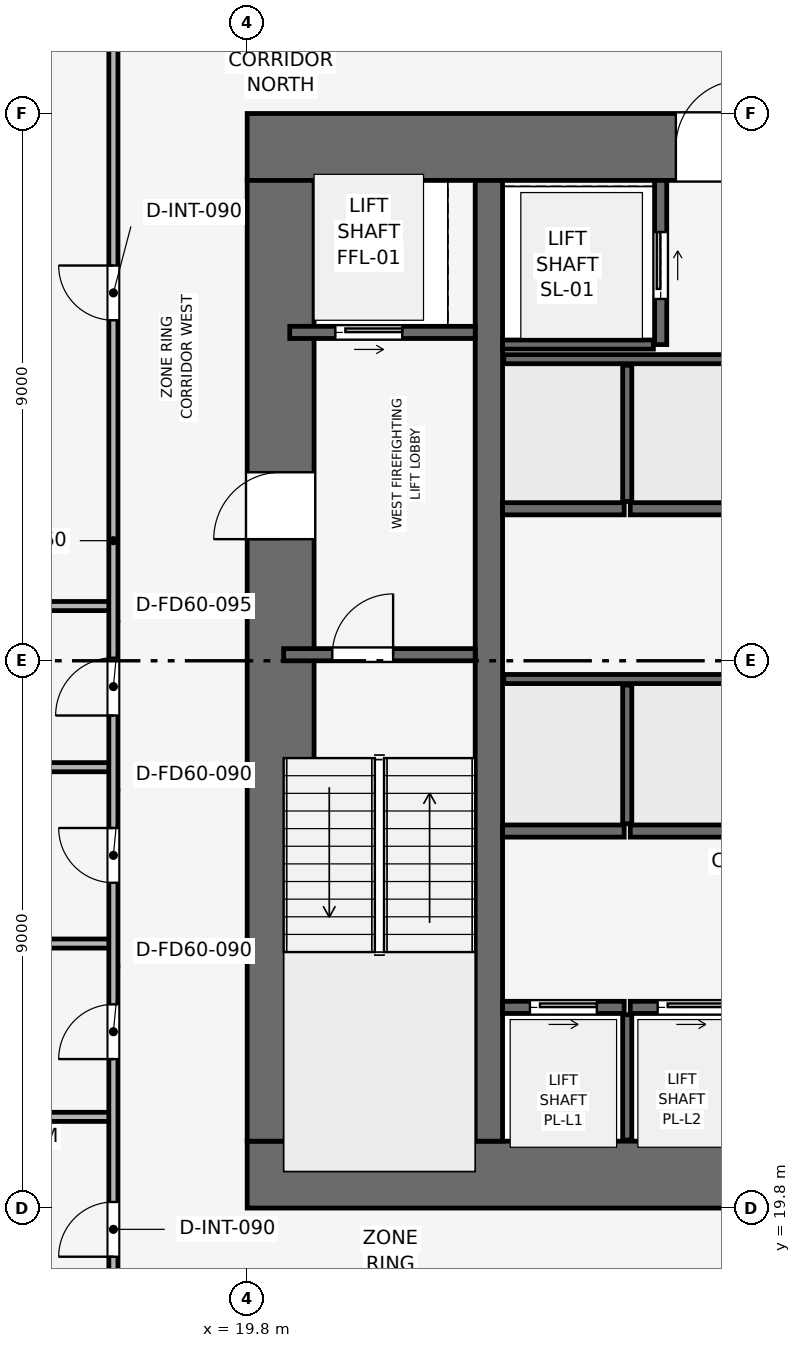
"""IFC4 building model, lengths in metres.
Left out: names, types, materials, properties, quantities, classifications, styles, units other than length and angle.
Written with IfcOpenShell. Run it as: python <this file> out.ifc"""

import sys

from ifc_helpers import new_model, si_unit, direction, frame, frame_2d, origin, place, context, subcontext, project, spatial, rectangle, extrude, element, fill, save


model = new_model("IFC4")
c1 = context("Model", 3, precision=1e-05, world=origin(), true_north=direction((0.0, 1.0)))
c2 = subcontext(c1, "Body", "Model", "MODEL_VIEW")
j1 = project(units=[si_unit("LENGTHUNIT", "METRE"), si_unit("PLANEANGLEUNIT", "RADIAN")], contexts=[c1])
p1 = place(None, origin())
s1 = spatial("IfcSite", under=j1, at=p1, CompositionType="ELEMENT")
p2 = place(p1, origin())
s2 = spatial("IfcBuilding", under=s1, at=p2, CompositionType="ELEMENT")
p3 = place(p2, frame((0.0, 0.0, 76.8)))
s3 = spatial("IfcBuildingStorey", under=s2, at=p3, CompositionType="ELEMENT", Elevation=76.8)
p4 = place(p3, frame((19.8, 20.35, 0.0), z_axis=(0.0, 0.0, 1.0), x_axis=(1.0, 0.0, 0.0)))
e1 = element("IfcWall", 1, at=p4, inside=s3, PredefinedType="SHEAR", context=c2, shape_type="SweptSolid", body=[
    extrude(rectangle(XDim=18.0, YDim=1.1, at=frame_2d((9.0, 0.0))), origin(), (0.0, 0.0, 1.0), 3.9),
])
p5 = place(p4, frame((8.4, 0.0, 0.0)))
e2 = element("IfcOpeningElement", 2, at=p5, cuts=e1, PredefinedType="OPENING", context=c2, shape_type="SweptSolid", body=[
    extrude(rectangle(XDim=1.2, YDim=2.2, at=frame_2d((0.6, 1.1))), frame((0.0, 0.56, 0.0), z_axis=(0.0, -1.0, 0.0), x_axis=(1.0, 0.0, 0.0)), (0.0, 0.0, 1.0), 1.12),
])
p6 = place(p3, frame((19.8, 37.25, 0.0), z_axis=(0.0, 0.0, 1.0), x_axis=(1.0, 0.0, 0.0)))
e3 = element("IfcWall", 3, at=p6, inside=s3, PredefinedType="SHEAR", context=c2, shape_type="SweptSolid", body=[
    extrude(rectangle(XDim=18.0, YDim=1.1, at=frame_2d((9.0, 0.0))), origin(), (0.0, 0.0, 1.0), 3.9),
])
p7 = place(p6, frame((7.05, 0.0, 0.0)))
e4 = element("IfcOpeningElement", 4, at=p7, cuts=e3, PredefinedType="OPENING", context=c2, shape_type="SweptSolid", body=[
    extrude(rectangle(XDim=1.1, YDim=2.15, at=frame_2d((0.55, 1.075))), frame((0.0, 0.56, 0.0), z_axis=(0.0, -1.0, 0.0), x_axis=(1.0, 0.0, 0.0)), (0.0, 0.0, 1.0), 1.12),
])
p8 = place(p3, frame((20.35, 20.9, 0.0), z_axis=(0.0, 0.0, 1.0), x_axis=(0.0, 1.0, 0.0)))
e5 = element("IfcWall", 5, at=p8, inside=s3, PredefinedType="SHEAR", context=c2, shape_type="SweptSolid", body=[
    extrude(rectangle(XDim=15.8, YDim=1.1, at=frame_2d((7.9, 0.0))), origin(), (0.0, 0.0, 1.0), 3.9),
])
p9 = place(p8, frame((9.9, 0.0, 0.0)))
e6 = element("IfcOpeningElement", 6, at=p9, cuts=e5, PredefinedType="OPENING", context=c2, shape_type="SweptSolid", body=[
    extrude(rectangle(XDim=1.1, YDim=2.15, at=frame_2d((0.55, 1.075))), frame((0.0, 0.56, 0.0), z_axis=(0.0, -1.0, 0.0), x_axis=(1.0, 0.0, 0.0)), (0.0, 0.0, 1.0), 1.12),
])
p10 = place(p3, frame((23.775, 20.9, 0.0), z_axis=(0.0, 0.0, 1.0), x_axis=(0.0, 1.0, 0.0)))
e7 = element("IfcWall", 7, at=p10, inside=s3, PredefinedType="SHEAR", context=c2, shape_type="SweptSolid", body=[
    extrude(rectangle(XDim=15.8, YDim=0.45, at=frame_2d((7.9, 0.0))), origin(), (0.0, 0.0, 1.0), 3.9),
])
p11 = place(p3, frame((20.4, 28.9, 0.0), z_axis=(0.0, 0.0, 1.0), x_axis=(1.0, 0.0, 0.0)))
e8 = element("IfcWall", 8, at=p11, inside=s3, PredefinedType="SHEAR", context=c2, shape_type="SweptSolid", body=[
    extrude(rectangle(XDim=3.15, YDim=0.2, at=frame_2d((1.575, 0.0))), origin(), (0.0, 0.0, 1.0), 3.65),
])
p12 = place(p11, frame((0.8, 0.0, 0.0)))
e9 = element("IfcOpeningElement", 9, at=p12, cuts=e8, PredefinedType="OPENING", context=c2, shape_type="SweptSolid", body=[
    extrude(rectangle(XDim=1.0, YDim=2.1, at=frame_2d((0.5, 1.05))), frame((0.0, 0.11, 0.0), z_axis=(0.0, -1.0, 0.0), x_axis=(1.0, 0.0, 0.0)), (0.0, 0.0, 1.0), 0.22),
])
p13 = place(p3, frame((20.5, 34.2, 0.0), z_axis=(0.0, 0.0, 1.0), x_axis=(1.0, 0.0, 0.0)))
e10 = element("IfcWall", 10, at=p13, inside=s3, PredefinedType="SHEAR", context=c2, shape_type="SweptSolid", body=[
    extrude(rectangle(XDim=3.05, YDim=0.2, at=frame_2d((1.525, 0.0))), origin(), (0.0, 0.0, 1.0), 3.65),
])
p14 = place(p13, frame((0.75, 0.0, 0.0)))
e11 = element("IfcOpeningElement", 11, at=p14, cuts=e10, PredefinedType="OPENING", context=c2, shape_type="SweptSolid", body=[
    extrude(rectangle(XDim=1.1, YDim=2.15, at=frame_2d((0.55, 1.075))), frame((0.0, 0.11, 0.0), z_axis=(0.0, -1.0, 0.0), x_axis=(1.0, 0.0, 0.0)), (0.0, 0.0, 1.0), 0.22),
])
p15 = place(p3, frame((26.6, 34.0, 0.0), z_axis=(0.0, 0.0, 1.0), x_axis=(0.0, 1.0, 0.0)))
e12 = element("IfcWall", 12, at=p15, inside=s3, PredefinedType="SHEAR", context=c2, shape_type="SweptSolid", body=[
    extrude(rectangle(XDim=2.7, YDim=0.2, at=frame_2d((1.35, 0.0))), origin(), (0.0, 0.0, 1.0), 3.65),
])
p16 = place(p15, frame((0.75, 0.0, 0.0)))
e13 = element("IfcOpeningElement", 13, at=p16, cuts=e12, PredefinedType="OPENING", context=c2, shape_type="SweptSolid", body=[
    extrude(rectangle(XDim=1.1, YDim=2.15, at=frame_2d((0.55, 1.075))), frame((0.0, 0.11, 0.0), z_axis=(0.0, -1.0, 0.0), x_axis=(1.0, 0.0, 0.0)), (0.0, 0.0, 1.0), 0.22),
])
p17 = place(p3, frame((24.0, 34.0, 0.0), z_axis=(0.0, 0.0, 1.0), x_axis=(1.0, 0.0, 0.0)))
e14 = element("IfcWall", 14, at=p17, inside=s3, PredefinedType="SHEAR", context=c2, shape_type="SweptSolid", body=[
    extrude(rectangle(XDim=2.48, YDim=0.15, at=frame_2d((1.24, 0.0))), origin(), (0.0, 0.0, 1.0), 3.65),
])
p18 = place(p3, frame((24.0, 23.1, 0.0), z_axis=(0.0, 0.0, 1.0), x_axis=(1.0, 0.0, 0.0)))
e15 = element("IfcWall", 15, at=p18, inside=s3, PredefinedType="SHEAR", context=c2, shape_type="SweptSolid", body=[
    extrude(rectangle(XDim=2.0, YDim=0.2, at=frame_2d((1.0, 0.0))), origin(), (0.0, 0.0, 1.0), 3.65),
])
p19 = place(p18, frame((0.45, 0.0, 0.0)))
e16 = element("IfcOpeningElement", 16, at=p19, cuts=e15, PredefinedType="OPENING", context=c2, shape_type="SweptSolid", body=[
    extrude(rectangle(XDim=1.1, YDim=2.15, at=frame_2d((0.55, 1.075))), frame((0.0, 0.11, 0.0), z_axis=(0.0, -1.0, 0.0), x_axis=(1.0, 0.0, 0.0)), (0.0, 0.0, 1.0), 0.22),
])
p20 = place(p3, frame((26.1, 23.1, 0.0), z_axis=(0.0, 0.0, 1.0), x_axis=(1.0, 0.0, 0.0)))
e17 = element("IfcWall", 17, at=p20, inside=s3, PredefinedType="SHEAR", context=c2, shape_type="SweptSolid", body=[
    extrude(rectangle(XDim=2.0, YDim=0.2, at=frame_2d((1.0, 0.0))), origin(), (0.0, 0.0, 1.0), 3.65),
])
p21 = place(p20, frame((0.45, 0.0, 0.0)))
e18 = element("IfcOpeningElement", 18, at=p21, cuts=e17, PredefinedType="OPENING", context=c2, shape_type="SweptSolid", body=[
    extrude(rectangle(XDim=1.1, YDim=2.15, at=frame_2d((0.55, 1.075))), frame((0.0, 0.11, 0.0), z_axis=(0.0, -1.0, 0.0), x_axis=(1.0, 0.0, 0.0)), (0.0, 0.0, 1.0), 0.22),
])
for number, where, z_axis, x_axis in (
    (19, (24.0, 26.0, 0.0), (0.0, 0.0, 1.0), (1.0, 0.0, 0.0)),
    (20, (26.1, 26.0, 0.0), (0.0, 0.0, 1.0), (1.0, 0.0, 0.0)),
    (21, (24.0, 31.3, 0.0), (0.0, 0.0, 1.0), (1.0, 0.0, 0.0)),
    (22, (26.1, 31.3, 0.0), (0.0, 0.0, 1.0), (1.0, 0.0, 0.0)),
):
    element("IfcWall", number, at=place(p3, frame(where, z_axis=z_axis, x_axis=x_axis)), inside=s3, PredefinedType="SHEAR", context=c2, shape_type="SweptSolid", body=[
        extrude(rectangle(XDim=2.0, YDim=0.2, at=frame_2d((1.0, 0.0))), origin(), (0.0, 0.0, 1.0), 3.65),
    ])
p22 = place(p3, frame((26.05, 20.92, 0.0), z_axis=(0.0, 0.0, 1.0), x_axis=(0.0, 1.0, 0.0)))
e23 = element("IfcWall", 23, at=p22, inside=s3, PredefinedType="SHEAR", context=c2, shape_type="SweptSolid", body=[
    extrude(rectangle(XDim=2.06, YDim=0.15, at=frame_2d((1.03, 0.0))), origin(), (0.0, 0.0, 1.0), 3.65),
])
p23 = place(p3, frame((24.02, 28.5, 0.0), z_axis=(0.0, 0.0, 1.0), x_axis=(1.0, 0.0, 0.0)))
e24 = element("IfcWall", 24, at=p23, inside=s3, PredefinedType="SHEAR", context=c2, shape_type="SweptSolid", body=[
    extrude(rectangle(XDim=4.08, YDim=0.15, at=frame_2d((2.04, 0.0))), origin(), (0.0, 0.0, 1.0), 3.65),
])
p24 = place(p3, frame((26.05, 26.12, 0.0), z_axis=(0.0, 0.0, 1.0), x_axis=(0.0, 1.0, 0.0)))
e25 = element("IfcWall", 25, at=p24, inside=s3, PredefinedType="SHEAR", context=c2, shape_type="SweptSolid", body=[
    extrude(rectangle(XDim=2.28, YDim=0.15, at=frame_2d((1.14, 0.0))), origin(), (0.0, 0.0, 1.0), 3.65),
])
p25 = place(p3, frame((24.02, 33.76, 0.0), z_axis=(0.0, 0.0, 1.0), x_axis=(1.0, 0.0, 0.0)))
e26 = element("IfcWall", 26, at=p25, inside=s3, PredefinedType="SHEAR", context=c2, shape_type="SweptSolid", body=[
    extrude(rectangle(XDim=4.08, YDim=0.15, at=frame_2d((2.04, 0.0))), origin(), (0.0, 0.0, 1.0), 3.65),
])
p26 = place(p3, frame((26.05, 31.42, 0.0), z_axis=(0.0, 0.0, 1.0), x_axis=(0.0, 1.0, 0.0)))
e27 = element("IfcWall", 27, at=p26, inside=s3, PredefinedType="SHEAR", context=c2, shape_type="SweptSolid", body=[
    extrude(rectangle(XDim=2.24, YDim=0.15, at=frame_2d((1.12, 0.0))), origin(), (0.0, 0.0, 1.0), 3.65),
])
p27 = place(p3, frame((1.03, 21.3, 0.0), z_axis=(0.0, 0.0, 1.0), x_axis=(1.0, 0.0, 0.0)))
e28 = element("IfcWall", 28, at=p27, inside=s3, PredefinedType="PARTITIONING", context=c2, shape_type="SweptSolid", body=[
    extrude(rectangle(XDim=16.57, YDim=0.15, at=frame_2d((8.285, 0.0))), origin(), (0.0, 0.0, 1.0), 2.935),
])
p28 = place(p27, frame((6.235, 0.0, 0.0)))
e29 = element("IfcOpeningElement", 29, at=p28, cuts=e28, PredefinedType="OPENING", context=c2, shape_type="SweptSolid", body=[
    extrude(rectangle(XDim=0.9, YDim=2.1, at=frame_2d((0.45, 1.05))), frame((0.0, 0.085, 0.0), z_axis=(0.0, -1.0, 0.0), x_axis=(1.0, 0.0, 0.0)), (0.0, 0.0, 1.0), 0.17),
])
p29 = place(p3, frame((1.03, 29.7, 0.0), z_axis=(0.0, 0.0, 1.0), x_axis=(1.0, 0.0, 0.0)))
e30 = element("IfcWall", 30, at=p29, inside=s3, PredefinedType="PARTITIONING", context=c2, shape_type="SweptSolid", body=[
    extrude(rectangle(XDim=16.57, YDim=0.15, at=frame_2d((8.285, 0.0))), origin(), (0.0, 0.0, 1.0), 2.935),
])
for number, where, z_axis, x_axis in (
    (31, (14.4, 24.15, 0.0), (0.0, 0.0, 1.0), (1.0, 0.0, 0.0)),
    (32, (14.4, 27.05, 0.0), (0.0, 0.0, 1.0), (1.0, 0.0, 0.0)),
):
    element("IfcWall", number, at=place(p3, frame(where, z_axis=z_axis, x_axis=x_axis)), inside=s3, PredefinedType="PARTITIONING", context=c2, shape_type="SweptSolid", body=[
        extrude(rectangle(XDim=3.2, YDim=0.15, at=frame_2d((1.6, 0.0))), origin(), (0.0, 0.0, 1.0), 3.65),
    ])
p30 = place(p3, frame((17.6, 17.6, 0.0), z_axis=(0.0, 0.0, 1.0), x_axis=(0.0, 1.0, 0.0)))
e33 = element("IfcWall", 33, at=p30, inside=s3, PredefinedType="PARTITIONING", context=c2, shape_type="SweptSolid", body=[
    extrude(rectangle(XDim=22.4, YDim=0.15, at=frame_2d((11.2, 0.0))), origin(), (0.0, 0.0, 1.0), 3.085),
])
p31 = place(p30, frame((1.4, 0.0, 0.0)))
e34 = element("IfcOpeningElement", 34, at=p31, cuts=e33, PredefinedType="OPENING", context=c2, shape_type="SweptSolid", body=[
    extrude(rectangle(XDim=0.9, YDim=2.1, at=frame_2d((0.45, 1.05))), frame((0.0, 0.085, 0.0), z_axis=(0.0, -1.0, 0.0), x_axis=(1.0, 0.0, 0.0)), (0.0, 0.0, 1.0), 0.17),
])
p32 = place(p30, frame((4.65, 0.0, 0.0)))
e35 = element("IfcOpeningElement", 35, at=p32, cuts=e33, PredefinedType="OPENING", context=c2, shape_type="SweptSolid", body=[
    extrude(rectangle(XDim=0.9, YDim=2.1, at=frame_2d((0.45, 1.05))), frame((0.0, 0.085, 0.0), z_axis=(0.0, -1.0, 0.0), x_axis=(1.0, 0.0, 0.0)), (0.0, 0.0, 1.0), 0.17),
])
p33 = place(p30, frame((7.55, 0.0, 0.0)))
e36 = element("IfcOpeningElement", 36, at=p33, cuts=e33, PredefinedType="OPENING", context=c2, shape_type="SweptSolid", body=[
    extrude(rectangle(XDim=0.9, YDim=2.1, at=frame_2d((0.45, 1.05))), frame((0.0, 0.085, 0.0), z_axis=(0.0, -1.0, 0.0), x_axis=(1.0, 0.0, 0.0)), (0.0, 0.0, 1.0), 0.17),
])
p34 = place(p30, frame((10.3, 0.0, 0.0)))
e37 = element("IfcOpeningElement", 37, at=p34, cuts=e33, PredefinedType="OPENING", context=c2, shape_type="SweptSolid", body=[
    extrude(rectangle(XDim=0.95, YDim=2.1, at=frame_2d((0.475, 1.05))), frame((0.0, 0.085, 0.0), z_axis=(0.0, -1.0, 0.0), x_axis=(1.0, 0.0, 0.0)), (0.0, 0.0, 1.0), 0.17),
])
p35 = place(p30, frame((16.8, 0.0, 0.0)))
e38 = element("IfcOpeningElement", 38, at=p35, cuts=e33, PredefinedType="OPENING", context=c2, shape_type="SweptSolid", body=[
    extrude(rectangle(XDim=0.9, YDim=2.1, at=frame_2d((0.45, 1.05))), frame((0.0, 0.085, 0.0), z_axis=(0.0, -1.0, 0.0), x_axis=(1.0, 0.0, 0.0)), (0.0, 0.0, 1.0), 0.17),
])
p36 = place(p12, origin())
e39 = element("IfcDoor", 39, at=p36, inside=s3, OperationType="SINGLE_SWING_RIGHT", PredefinedType="DOOR", context=c2, shape_type="SweptSolid", body=[
    extrude(rectangle(XDim=1.0, YDim=2.1, at=frame_2d((0.5, 1.05))), frame((0.0, 0.025, 0.0), z_axis=(0.0, -1.0, 0.0), x_axis=(1.0, 0.0, 0.0)), (0.0, 0.0, 1.0), 0.05),
])
fill(e9, e39)
p37 = place(p14, origin())
e40 = element("IfcDoor", 40, at=p37, inside=s3, OperationType="SLIDING_TO_RIGHT", PredefinedType="DOOR", context=c2, shape_type="SweptSolid", body=[
    extrude(rectangle(XDim=1.1, YDim=2.15, at=frame_2d((0.55, 1.075))), frame((0.0, 0.025, 0.0), z_axis=(0.0, -1.0, 0.0), x_axis=(1.0, 0.0, 0.0)), (0.0, 0.0, 1.0), 0.05),
])
fill(e11, e40)
p38 = place(p16, origin())
e41 = element("IfcDoor", 41, at=p38, inside=s3, OperationType="SLIDING_TO_RIGHT", PredefinedType="DOOR", context=c2, shape_type="SweptSolid", body=[
    extrude(rectangle(XDim=1.1, YDim=2.15, at=frame_2d((0.55, 1.075))), frame((0.0, 0.025, 0.0), z_axis=(0.0, -1.0, 0.0), x_axis=(1.0, 0.0, 0.0)), (0.0, 0.0, 1.0), 0.05),
])
fill(e13, e41)
p39 = place(p19, origin())
e42 = element("IfcDoor", 42, at=p39, inside=s3, OperationType="SLIDING_TO_RIGHT", PredefinedType="DOOR", context=c2, shape_type="SweptSolid", body=[
    extrude(rectangle(XDim=1.1, YDim=2.15, at=frame_2d((0.55, 1.075))), frame((0.0, 0.025, 0.0), z_axis=(0.0, -1.0, 0.0), x_axis=(1.0, 0.0, 0.0)), (0.0, 0.0, 1.0), 0.05),
])
fill(e16, e42)
p40 = place(p21, origin())
e43 = element("IfcDoor", 43, at=p40, inside=s3, OperationType="SLIDING_TO_RIGHT", PredefinedType="DOOR", context=c2, shape_type="SweptSolid", body=[
    extrude(rectangle(XDim=1.1, YDim=2.15, at=frame_2d((0.55, 1.075))), frame((0.0, 0.025, 0.0), z_axis=(0.0, -1.0, 0.0), x_axis=(1.0, 0.0, 0.0)), (0.0, 0.0, 1.0), 0.05),
])
fill(e18, e43)
p41 = place(p31, origin())
e44 = element("IfcDoor", 44, at=p41, inside=s3, OperationType="SINGLE_SWING_LEFT", PredefinedType="DOOR", context=c2, shape_type="SweptSolid", body=[
    extrude(rectangle(XDim=0.9, YDim=2.1, at=frame_2d((0.45, 1.05))), frame((0.0, 0.025, 0.0), z_axis=(0.0, -1.0, 0.0), x_axis=(1.0, 0.0, 0.0)), (0.0, 0.0, 1.0), 0.05),
])
fill(e34, e44)
p42 = place(p32, origin())
e45 = element("IfcDoor", 45, at=p42, inside=s3, OperationType="SINGLE_SWING_LEFT", PredefinedType="DOOR", context=c2, shape_type="SweptSolid", body=[
    extrude(rectangle(XDim=0.9, YDim=2.1, at=frame_2d((0.45, 1.05))), frame((0.0, 0.025, 0.0), z_axis=(0.0, -1.0, 0.0), x_axis=(1.0, 0.0, 0.0)), (0.0, 0.0, 1.0), 0.05),
])
fill(e35, e45)
p43 = place(p33, origin())
e46 = element("IfcDoor", 46, at=p43, inside=s3, OperationType="SINGLE_SWING_RIGHT", PredefinedType="DOOR", context=c2, shape_type="SweptSolid", body=[
    extrude(rectangle(XDim=0.9, YDim=2.1, at=frame_2d((0.45, 1.05))), frame((0.0, 0.025, 0.0), z_axis=(0.0, -1.0, 0.0), x_axis=(1.0, 0.0, 0.0)), (0.0, 0.0, 1.0), 0.05),
])
fill(e36, e46)
p44 = place(p34, origin())
e47 = element("IfcDoor", 47, at=p44, inside=s3, OperationType="SINGLE_SWING_LEFT", PredefinedType="DOOR", context=c2, shape_type="SweptSolid", body=[
    extrude(rectangle(XDim=0.95, YDim=2.1, at=frame_2d((0.475, 1.05))), frame((0.0, 0.025, 0.0), z_axis=(0.0, -1.0, 0.0), x_axis=(1.0, 0.0, 0.0)), (0.0, 0.0, 1.0), 0.05),
])
fill(e37, e47)
p45 = place(p35, origin())
e48 = element("IfcDoor", 48, at=p45, inside=s3, OperationType="SINGLE_SWING_RIGHT", PredefinedType="DOOR", context=c2, shape_type="SweptSolid", body=[
    extrude(rectangle(XDim=0.9, YDim=2.1, at=frame_2d((0.45, 1.05))), frame((0.0, 0.025, 0.0), z_axis=(0.0, -1.0, 0.0), x_axis=(1.0, 0.0, 0.0)), (0.0, 0.0, 1.0), 0.05),
])
fill(e38, e48)
p46 = place(p9, origin())
e49 = element("IfcDoor", 49, at=p46, inside=s3, OperationType="SINGLE_SWING_LEFT", PredefinedType="DOOR", context=c2, shape_type="SweptSolid", body=[
    extrude(rectangle(XDim=1.1, YDim=2.15, at=frame_2d((0.55, 1.075))), frame((0.0, 0.025, 0.0), z_axis=(0.0, -1.0, 0.0), x_axis=(1.0, 0.0, 0.0)), (0.0, 0.0, 1.0), 0.05),
])
fill(e6, e49)
p47 = place(p7, origin())
e50 = element("IfcDoor", 50, at=p47, inside=s3, OperationType="SINGLE_SWING_RIGHT", PredefinedType="DOOR", context=c2, shape_type="SweptSolid", body=[
    extrude(rectangle(XDim=1.1, YDim=2.15, at=frame_2d((0.55, 1.075))), frame((0.0, 0.025, 0.0), z_axis=(0.0, -1.0, 0.0), x_axis=(1.0, 0.0, 0.0)), (0.0, 0.0, 1.0), 0.05),
])
fill(e4, e50)
save(model, sys.argv[1])
